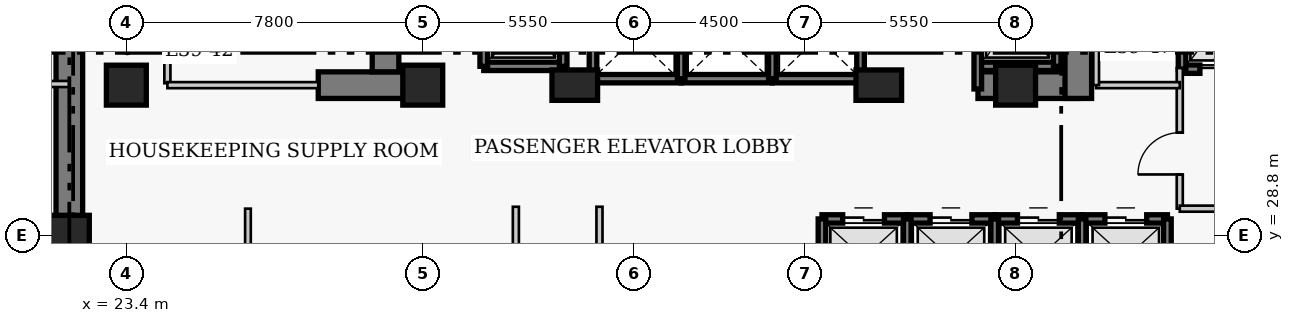
"""IFC4 building model, lengths in metres.
Left out: names, types, materials, properties, quantities, classifications, styles, units other than length and angle.
Written with IfcOpenShell. Run it as: python <this file> out.ifc"""

import sys

from ifc_helpers import new_model, si_unit, direction, frame, frame_2d, origin, origin_2d, place, context, subcontext, project, spatial, rectangle, extrude, element, fill, save


model = new_model("IFC4")
c1 = context("Model", 3, precision=1e-05, world=origin(), true_north=direction((0.0, 1.0)))
c2 = subcontext(c1, "Body", "Model", "MODEL_VIEW")
j1 = project(units=[si_unit("LENGTHUNIT", "METRE"), si_unit("PLANEANGLEUNIT", "RADIAN")], contexts=[c1])
p1 = place(None, origin())
s1 = spatial("IfcSite", under=j1, at=p1, CompositionType="ELEMENT")
p2 = place(p1, origin())
s2 = spatial("IfcBuilding", under=s1, at=p2, CompositionType="ELEMENT")
p3 = place(p2, frame((0.0, 0.0, 157.4)))
s3 = spatial("IfcBuildingStorey", under=s2, at=p3, CompositionType="ELEMENT", Elevation=157.4)
p4 = place(p3, frame((21.9, 27.05, 0.0), z_axis=(0.0, 0.0, 1.0), x_axis=(0.0, 1.0, 0.0)))
e1 = element("IfcWall", 1, at=p4, inside=s3, PredefinedType="SHEAR", context=c2, shape_type="SweptSolid", body=[
    extrude(rectangle(XDim=13.62, YDim=0.7, at=frame_2d((6.81, 0.0))), origin(), (0.0, 0.0, 1.0), 3.8),
])
p5 = place(p3, frame((28.45, 32.75, 0.0), z_axis=(0.0, 0.0, 1.0), x_axis=(1.0, 0.0, 0.0)))
e2 = element("IfcWall", 2, at=p5, inside=s3, PredefinedType="SHEAR", context=c2, shape_type="SweptSolid", body=[
    extrude(rectangle(XDim=2.4, YDim=0.7, at=frame_2d((1.2, 0.0))), origin(), (0.0, 0.0, 1.0), 3.8),
])
p6 = place(p3, frame((45.81, 32.75, 0.0), z_axis=(0.0, 0.0, 1.0), x_axis=(1.0, 0.0, 0.0)))
e3 = element("IfcWall", 3, at=p6, inside=s3, PredefinedType="SHEAR", context=c2, shape_type="SweptSolid", body=[
    extrude(rectangle(XDim=2.64, YDim=0.7, at=frame_2d((1.32, 0.0))), origin(), (0.0, 0.0, 1.0), 3.8),
])
p7 = place(p3, frame((30.22, 33.1, 0.0), z_axis=(0.0, 0.0, 1.0), x_axis=(0.0, 1.0, 0.0)))
e4 = element("IfcWall", 4, at=p7, inside=s3, PredefinedType="SHEAR", context=c2, shape_type="SweptSolid", body=[
    extrude(rectangle(XDim=7.22, YDim=0.7, at=frame_2d((3.61, 0.0))), origin(), (0.0, 0.0, 1.0), 3.8),
])
p8 = place(p3, frame((48.45, 32.4, 0.0), z_axis=(0.0, 0.0, 1.0), x_axis=(0.0, 1.0, 0.0)))
e5 = element("IfcWall", 5, at=p8, inside=s3, PredefinedType="SHEAR", context=c2, shape_type="SweptSolid", body=[
    extrude(rectangle(XDim=7.92, YDim=0.7, at=frame_2d((3.96, 0.0))), origin(), (0.0, 0.0, 1.0), 3.8),
])
p9 = place(p8, frame((5.8, 0.0, 0.0)))
e6 = element("IfcOpeningElement", 6, at=p9, cuts=e5, PredefinedType="OPENING", context=c2, shape_type="SweptSolid", body=[
    extrude(rectangle(XDim=1.1, YDim=2.15, at=frame_2d((0.55, 1.075))), frame((0.0, 0.36, 0.0), z_axis=(0.0, -1.0, 0.0), x_axis=(1.0, 0.0, 0.0)), (0.0, 0.0, 1.0), 0.72),
])
for number, where, z_axis, x_axis in (
    (7, (21.9, 28.8, 0.0), (0.0, 0.0, 1.0), (1.0, 0.0, 0.0)),
    (8, (23.4, 32.75, 0.0), (0.0, 0.0, 1.0), (1.0, 0.0, 0.0)),
    (9, (31.2, 32.75, 0.0), (0.0, 0.0, 1.0), (1.0, 0.0, 0.0)),
):
    element("IfcColumn", number, at=place(p3, frame(where, z_axis=z_axis, x_axis=x_axis)), inside=s3, PredefinedType="COLUMN", context=c2, shape_type="SweptSolid", body=[
        extrude(rectangle(XDim=1.05, YDim=1.05, at=origin_2d()), origin(), (0.0, 0.0, 1.0), 3.8),
    ])
for number, where, z_axis, x_axis in (
    (10, (35.2, 32.75, 0.0), (0.0, 0.0, 1.0), (1.0, 0.0, 0.0)),
    (11, (43.2, 32.75, 0.0), (0.0, 0.0, 1.0), (1.0, 0.0, 0.0)),
):
    element("IfcColumn", number, at=place(p3, frame(where, z_axis=z_axis, x_axis=x_axis)), inside=s3, PredefinedType="COLUMN", context=c2, shape_type="SweptSolid", body=[
        extrude(rectangle(XDim=1.2, YDim=0.8, at=origin_2d()), origin(), (0.0, 0.0, 1.0), 3.8),
    ])
p10 = place(p3, frame((46.8, 32.75, 0.0), z_axis=(0.0, 0.0, 1.0), x_axis=(1.0, 0.0, 0.0)))
e12 = element("IfcColumn", 12, at=p10, inside=s3, PredefinedType="COLUMN", context=c2, shape_type="SweptSolid", body=[
    extrude(rectangle(XDim=1.05, YDim=1.05, at=origin_2d()), origin(), (0.0, 0.0, 1.0), 3.8),
])
p11 = place(p3, frame((41.705, 29.23, 0.0), z_axis=(0.0, 0.0, 1.0), x_axis=(1.0, 0.0, 0.0)))
e13 = element("IfcWall", 13, at=p11, inside=s3, PredefinedType="SHEAR", context=c2, shape_type="SweptSolid", body=[
    extrude(rectangle(XDim=2.245, YDim=0.22, at=frame_2d((1.123, 0.0))), origin(), (0.0, 0.0, 1.0), 3.8),
])
p12 = place(p11, frame((0.545, 0.0, 0.0)))
e14 = element("IfcOpeningElement", 14, at=p12, cuts=e13, PredefinedType="OPENING", context=c2, shape_type="SweptSolid", body=[
    extrude(rectangle(XDim=1.1, YDim=2.15, at=frame_2d((0.55, 1.075))), frame((0.0, 0.12, 0.0), z_axis=(0.0, -1.0, 0.0), x_axis=(1.0, 0.0, 0.0)), (0.0, 0.0, 1.0), 0.24),
])
p13 = place(p3, frame((41.705, 27.17, 0.0), z_axis=(0.0, 0.0, 1.0), x_axis=(0.0, 1.0, 0.0)))
e15 = element("IfcWall", 15, at=p13, inside=s3, PredefinedType="SHEAR", context=c2, shape_type="SweptSolid", body=[
    extrude(rectangle(XDim=2.06, YDim=0.2, at=frame_2d((1.03, 0.0))), origin(), (0.0, 0.0, 1.0), 3.8),
])
p14 = place(p3, frame((43.95, 29.23, 0.0), z_axis=(0.0, 0.0, 1.0), x_axis=(1.0, 0.0, 0.0)))
e16 = element("IfcWall", 16, at=p14, inside=s3, PredefinedType="SHEAR", context=c2, shape_type="SweptSolid", body=[
    extrude(rectangle(XDim=2.3, YDim=0.22, at=frame_2d((1.15, 0.0))), origin(), (0.0, 0.0, 1.0), 3.8),
])
p15 = place(p14, frame((0.6, 0.0, 0.0)))
e17 = element("IfcOpeningElement", 17, at=p15, cuts=e16, PredefinedType="OPENING", context=c2, shape_type="SweptSolid", body=[
    extrude(rectangle(XDim=1.1, YDim=2.15, at=frame_2d((0.55, 1.075))), frame((0.0, 0.12, 0.0), z_axis=(0.0, -1.0, 0.0), x_axis=(1.0, 0.0, 0.0)), (0.0, 0.0, 1.0), 0.24),
])
p16 = place(p3, frame((43.95, 27.17, 0.0), z_axis=(0.0, 0.0, 1.0), x_axis=(0.0, 1.0, 0.0)))
e18 = element("IfcWall", 18, at=p16, inside=s3, PredefinedType="SHEAR", context=c2, shape_type="SweptSolid", body=[
    extrude(rectangle(XDim=2.06, YDim=0.2, at=frame_2d((1.03, 0.0))), origin(), (0.0, 0.0, 1.0), 3.8),
])
p17 = place(p3, frame((46.25, 29.23, 0.0), z_axis=(0.0, 0.0, 1.0), x_axis=(1.0, 0.0, 0.0)))
e19 = element("IfcWall", 19, at=p17, inside=s3, PredefinedType="SHEAR", context=c2, shape_type="SweptSolid", body=[
    extrude(rectangle(XDim=2.3, YDim=0.22, at=frame_2d((1.15, 0.0))), origin(), (0.0, 0.0, 1.0), 3.8),
])
p18 = place(p17, frame((0.6, 0.0, 0.0)))
e20 = element("IfcOpeningElement", 20, at=p18, cuts=e19, PredefinedType="OPENING", context=c2, shape_type="SweptSolid", body=[
    extrude(rectangle(XDim=1.1, YDim=2.15, at=frame_2d((0.55, 1.075))), frame((0.0, 0.12, 0.0), z_axis=(0.0, -1.0, 0.0), x_axis=(1.0, 0.0, 0.0)), (0.0, 0.0, 1.0), 0.24),
])
p19 = place(p3, frame((46.25, 27.17, 0.0), z_axis=(0.0, 0.0, 1.0), x_axis=(0.0, 1.0, 0.0)))
e21 = element("IfcWall", 21, at=p19, inside=s3, PredefinedType="SHEAR", context=c2, shape_type="SweptSolid", body=[
    extrude(rectangle(XDim=2.06, YDim=0.2, at=frame_2d((1.03, 0.0))), origin(), (0.0, 0.0, 1.0), 3.8),
])
p20 = place(p3, frame((48.55, 29.23, 0.0), z_axis=(0.0, 0.0, 1.0), x_axis=(1.0, 0.0, 0.0)))
e22 = element("IfcWall", 22, at=p20, inside=s3, PredefinedType="SHEAR", context=c2, shape_type="SweptSolid", body=[
    extrude(rectangle(XDim=2.245, YDim=0.22, at=frame_2d((1.123, 0.0))), origin(), (0.0, 0.0, 1.0), 3.8),
])
p21 = place(p20, frame((0.6, 0.0, 0.0)))
e23 = element("IfcOpeningElement", 23, at=p21, cuts=e22, PredefinedType="OPENING", context=c2, shape_type="SweptSolid", body=[
    extrude(rectangle(XDim=1.1, YDim=2.15, at=frame_2d((0.55, 1.075))), frame((0.0, 0.12, 0.0), z_axis=(0.0, -1.0, 0.0), x_axis=(1.0, 0.0, 0.0)), (0.0, 0.0, 1.0), 0.24),
])
for number, where, z_axis, x_axis in (
    (24, (48.55, 27.17, 0.0), (0.0, 0.0, 1.0), (0.0, 1.0, 0.0)),
    (25, (50.795, 27.17, 0.0), (0.0, 0.0, 1.0), (0.0, 1.0, 0.0)),
):
    element("IfcWall", number, at=place(p3, frame(where, z_axis=z_axis, x_axis=x_axis)), inside=s3, PredefinedType="SHEAR", context=c2, shape_type="SweptSolid", body=[
        extrude(rectangle(XDim=2.06, YDim=0.2, at=frame_2d((1.03, 0.0))), origin(), (0.0, 0.0, 1.0), 3.8),
    ])
p22 = place(p3, frame((35.68, 32.92, 0.0), z_axis=(0.0, 0.0, 1.0), x_axis=(1.0, 0.0, 0.0)))
e26 = element("IfcWall", 26, at=p22, inside=s3, PredefinedType="SHEAR", context=c2, shape_type="SweptSolid", body=[
    extrude(rectangle(XDim=2.32, YDim=0.22, at=frame_2d((1.16, 0.0))), origin(), (0.0, 0.0, 1.0), 3.8),
])
p23 = place(p3, frame((35.68, 32.92, 0.0), z_axis=(0.0, 0.0, 1.0), x_axis=(0.0, 1.0, 0.0)))
e27 = element("IfcWall", 27, at=p23, inside=s3, PredefinedType="SHEAR", context=c2, shape_type="SweptSolid", body=[
    extrude(rectangle(XDim=2.16, YDim=0.2, at=frame_2d((1.08, 0.0))), origin(), (0.0, 0.0, 1.0), 3.8),
])
p24 = place(p3, frame((38.0, 32.92, 0.0), z_axis=(0.0, 0.0, 1.0), x_axis=(1.0, 0.0, 0.0)))
e28 = element("IfcWall", 28, at=p24, inside=s3, PredefinedType="SHEAR", context=c2, shape_type="SweptSolid", body=[
    extrude(rectangle(XDim=2.4, YDim=0.22, at=frame_2d((1.2, 0.0))), origin(), (0.0, 0.0, 1.0), 3.8),
])
p25 = place(p3, frame((38.0, 32.92, 0.0), z_axis=(0.0, 0.0, 1.0), x_axis=(0.0, 1.0, 0.0)))
e29 = element("IfcWall", 29, at=p25, inside=s3, PredefinedType="SHEAR", context=c2, shape_type="SweptSolid", body=[
    extrude(rectangle(XDim=2.16, YDim=0.2, at=frame_2d((1.08, 0.0))), origin(), (0.0, 0.0, 1.0), 3.8),
])
p26 = place(p3, frame((40.4, 32.92, 0.0), z_axis=(0.0, 0.0, 1.0), x_axis=(1.0, 0.0, 0.0)))
e30 = element("IfcWall", 30, at=p26, inside=s3, PredefinedType="SHEAR", context=c2, shape_type="SweptSolid", body=[
    extrude(rectangle(XDim=2.32, YDim=0.22, at=frame_2d((1.16, 0.0))), origin(), (0.0, 0.0, 1.0), 3.8),
])
for number, where, z_axis, x_axis in (
    (31, (40.4, 32.92, 0.0), (0.0, 0.0, 1.0), (0.0, 1.0, 0.0)),
    (32, (42.72, 32.92, 0.0), (0.0, 0.0, 1.0), (0.0, 1.0, 0.0)),
):
    element("IfcWall", number, at=place(p3, frame(where, z_axis=z_axis, x_axis=x_axis)), inside=s3, PredefinedType="SHEAR", context=c2, shape_type="SweptSolid", body=[
        extrude(rectangle(XDim=2.16, YDim=0.2, at=frame_2d((1.08, 0.0))), origin(), (0.0, 0.0, 1.0), 3.8),
    ])
p27 = place(p3, frame((51.18, 33.17, 0.0), z_axis=(0.0, 0.0, 1.0), x_axis=(1.0, 0.0, 0.0)))
e33 = element("IfcWall", 33, at=p27, inside=s3, PredefinedType="SHEAR", context=c2, shape_type="SweptSolid", body=[
    extrude(rectangle(XDim=2.42, YDim=0.22, at=frame_2d((1.21, 0.0))), origin(), (0.0, 0.0, 1.0), 3.8),
])
p28 = place(p27, frame((0.47, 0.0, 0.0)))
e34 = element("IfcOpeningElement", 34, at=p28, cuts=e33, PredefinedType="OPENING", context=c2, shape_type="SweptSolid", body=[
    extrude(rectangle(XDim=1.3, YDim=2.15, at=frame_2d((0.65, 1.075))), frame((0.0, 0.12, 0.0), z_axis=(0.0, -1.0, 0.0), x_axis=(1.0, 0.0, 0.0)), (0.0, 0.0, 1.0), 0.24),
])
p29 = place(p3, frame((51.18, 33.17, 0.0), z_axis=(0.0, 0.0, 1.0), x_axis=(0.0, 1.0, 0.0)))
e35 = element("IfcWall", 35, at=p29, inside=s3, PredefinedType="SHEAR", context=c2, shape_type="SweptSolid", body=[
    extrude(rectangle(XDim=2.86, YDim=0.2, at=frame_2d((1.43, 0.0))), origin(), (0.0, 0.0, 1.0), 3.8),
])
p30 = place(p3, frame((32.805, 33.245, 0.0), z_axis=(0.0, 0.0, 1.0), x_axis=(1.0, 0.0, 0.0)))
e36 = element("IfcWall", 36, at=p30, inside=s3, PredefinedType="SHEAR", context=c2, shape_type="SweptSolid", body=[
    extrude(rectangle(XDim=2.09, YDim=0.22, at=frame_2d((1.045, 0.0))), origin(), (0.0, 0.0, 1.0), 3.8),
])
for number, where, z_axis, x_axis in (
    (37, (32.805, 33.245, 0.0), (0.0, 0.0, 1.0), (0.0, 1.0, 0.0)),
    (38, (34.895, 33.245, 0.0), (0.0, 0.0, 1.0), (0.0, 1.0, 0.0)),
):
    element("IfcWall", number, at=place(p3, frame(where, z_axis=z_axis, x_axis=x_axis)), inside=s3, PredefinedType="SHEAR", context=c2, shape_type="SweptSolid", body=[
        extrude(rectangle(XDim=2.91, YDim=0.2, at=frame_2d((1.455, 0.0))), origin(), (0.0, 0.0, 1.0), 3.8),
    ])
p31 = place(p3, frame((45.805, 33.245, 0.0), z_axis=(0.0, 0.0, 1.0), x_axis=(1.0, 0.0, 0.0)))
e39 = element("IfcWall", 39, at=p31, inside=s3, PredefinedType="SHEAR", context=c2, shape_type="SweptSolid", body=[
    extrude(rectangle(XDim=2.09, YDim=0.22, at=frame_2d((1.045, 0.0))), origin(), (0.0, 0.0, 1.0), 3.8),
])
p32 = place(p3, frame((45.805, 32.65, 0.0), z_axis=(0.0, 0.0, 1.0), x_axis=(0.0, 1.0, 0.0)))
e40 = element("IfcWall", 40, at=p32, inside=s3, PredefinedType="SHEAR", context=c2, shape_type="SweptSolid", body=[
    extrude(rectangle(XDim=3.505, YDim=0.2, at=frame_2d((1.752, 0.0))), origin(), (0.0, 0.0, 1.0), 3.8),
])
p33 = place(p3, frame((47.895, 33.245, 0.0), z_axis=(0.0, 0.0, 1.0), x_axis=(0.0, 1.0, 0.0)))
e41 = element("IfcWall", 41, at=p33, inside=s3, PredefinedType="SHEAR", context=c2, shape_type="SweptSolid", body=[
    extrude(rectangle(XDim=2.91, YDim=0.2, at=frame_2d((1.455, 0.0))), origin(), (0.0, 0.0, 1.0), 3.8),
])
p34 = place(p3, frame((24.48, 32.8, 0.0), z_axis=(0.0, 0.0, 1.0), x_axis=(0.0, 1.0, 0.0)))
e42 = element("IfcWall", 42, at=p34, inside=s3, PredefinedType="PARTITIONING", context=c2, shape_type="SweptSolid", body=[
    extrude(rectangle(XDim=3.57, YDim=0.16, at=frame_2d((1.785, 0.0))), origin(), (0.0, 0.0, 1.0), 3.55),
])
p35 = place(p34, frame((1.604, 0.0, 0.0)))
e43 = element("IfcOpeningElement", 43, at=p35, cuts=e42, PredefinedType="OPENING", context=c2, shape_type="SweptSolid", body=[
    extrude(rectangle(XDim=0.9, YDim=2.1, at=frame_2d((0.45, 1.05))), frame((0.0, 0.09, 0.0), z_axis=(0.0, -1.0, 0.0), x_axis=(1.0, 0.0, 0.0)), (0.0, 0.0, 1.0), 0.18),
])
p36 = place(p3, frame((51.12, 29.5, 0.0), z_axis=(0.0, 0.0, 1.0), x_axis=(0.0, 1.0, 0.0)))
e44 = element("IfcWall", 44, at=p36, inside=s3, PredefinedType="PARTITIONING", context=c2, shape_type="SweptSolid", body=[
    extrude(rectangle(XDim=3.7, YDim=0.16, at=frame_2d((1.85, 0.0))), origin(), (0.0, 0.0, 1.0), 3.55),
])
p37 = place(p36, frame((0.9, 0.0, 0.0)))
e45 = element("IfcOpeningElement", 45, at=p37, cuts=e44, PredefinedType="OPENING", context=c2, shape_type="SweptSolid", body=[
    extrude(rectangle(XDim=1.1, YDim=2.15, at=frame_2d((0.55, 1.075))), frame((0.0, 0.09, 0.0), z_axis=(0.0, -1.0, 0.0), x_axis=(1.0, 0.0, 0.0)), (0.0, 0.0, 1.0), 0.18),
])
p38 = place(p3, frame((51.12, 29.5, 0.0), z_axis=(0.0, 0.0, 1.0), x_axis=(1.0, 0.0, 0.0)))
e46 = element("IfcWall", 46, at=p38, inside=s3, PredefinedType="PARTITIONING", context=c2, shape_type="SweptSolid", body=[
    extrude(rectangle(XDim=5.63, YDim=0.16, at=frame_2d((2.815, 0.0))), origin(), (0.0, 0.0, 1.0), 3.55),
])
p39 = place(p3, frame((24.48, 32.75, 0.0), z_axis=(0.0, 0.0, 1.0), x_axis=(1.0, 0.0, 0.0)))
e47 = element("IfcWall", 47, at=p39, inside=s3, PredefinedType="PARTITIONING", context=c2, shape_type="SweptSolid", body=[
    extrude(rectangle(XDim=3.97, YDim=0.16, at=frame_2d((1.985, 0.0))), origin(), (0.0, 0.0, 1.0), 3.55),
])
p40 = place(p3, frame((48.92, 32.75, 0.0), z_axis=(0.0, 0.0, 1.0), x_axis=(1.0, 0.0, 0.0)))
e48 = element("IfcWall", 48, at=p40, inside=s3, PredefinedType="PARTITIONING", context=c2, shape_type="SweptSolid", body=[
    extrude(rectangle(XDim=2.2, YDim=0.16, at=frame_2d((1.1, 0.0))), origin(), (0.0, 0.0, 1.0), 3.55),
])
p41 = place(p3, frame((48.92, 32.75, 0.0), z_axis=(0.0, 0.0, 1.0), x_axis=(0.0, 1.0, 0.0)))
e49 = element("IfcWall", 49, at=p41, inside=s3, PredefinedType="PARTITIONING", context=c2, shape_type="SweptSolid", body=[
    extrude(rectangle(XDim=3.62, YDim=0.15, at=frame_2d((1.81, 0.0))), origin(), (0.0, 0.0, 1.0), 3.55),
])
for number, where, z_axis, x_axis in (
    (50, (33.65, 17.96, 0.0), (0.0, 0.0, 1.0), (0.0, 1.0, 0.0)),
    (51, (35.85, 17.96, 0.0), (0.0, 0.0, 1.0), (0.0, 1.0, 0.0)),
):
    element("IfcWall", number, at=place(p3, frame(where, z_axis=z_axis, x_axis=x_axis)), inside=s3, PredefinedType="PARTITIONING", context=c2, shape_type="SweptSolid", body=[
        extrude(rectangle(XDim=11.59, YDim=0.16, at=frame_2d((5.795, 0.0))), origin(), (0.0, 0.0, 1.0), 3.55),
    ])
p42 = place(p3, frame((18.86, 32.78, 0.0), z_axis=(0.0, 0.0, 1.0), x_axis=(1.0, 0.0, 0.0)))
e52 = element("IfcWall", 52, at=p42, inside=s3, PredefinedType="PARTITIONING", context=c2, shape_type="SweptSolid", body=[
    extrude(rectangle(XDim=3.04, YDim=0.16, at=frame_2d((1.52, 0.0))), origin(), (0.0, 0.0, 1.0), 3.55),
])
p43 = place(p3, frame((26.6, 17.96, 0.0), z_axis=(0.0, 0.0, 1.0), x_axis=(0.0, 1.0, 0.0)))
e53 = element("IfcWall", 53, at=p43, inside=s3, PredefinedType="PARTITIONING", context=c2, shape_type="SweptSolid", body=[
    extrude(rectangle(XDim=11.54, YDim=0.15, at=frame_2d((5.77, 0.0))), origin(), (0.0, 0.0, 1.0), 3.55),
])
p44 = place(p12, origin())
e54 = element("IfcDoor", 54, at=p44, inside=s3, OperationType="DOUBLE_DOOR_SLIDING", PredefinedType="DOOR", context=c2, shape_type="SweptSolid", body=[
    extrude(rectangle(XDim=1.1, YDim=2.15, at=frame_2d((0.55, 1.075))), frame((0.0, 0.025, 0.0), z_axis=(0.0, -1.0, 0.0), x_axis=(1.0, 0.0, 0.0)), (0.0, 0.0, 1.0), 0.05),
])
fill(e14, e54)
p45 = place(p15, origin())
e55 = element("IfcDoor", 55, at=p45, inside=s3, OperationType="DOUBLE_DOOR_SLIDING", PredefinedType="DOOR", context=c2, shape_type="SweptSolid", body=[
    extrude(rectangle(XDim=1.1, YDim=2.15, at=frame_2d((0.55, 1.075))), frame((0.0, 0.025, 0.0), z_axis=(0.0, -1.0, 0.0), x_axis=(1.0, 0.0, 0.0)), (0.0, 0.0, 1.0), 0.05),
])
fill(e17, e55)
p46 = place(p18, origin())
e56 = element("IfcDoor", 56, at=p46, inside=s3, OperationType="DOUBLE_DOOR_SLIDING", PredefinedType="DOOR", context=c2, shape_type="SweptSolid", body=[
    extrude(rectangle(XDim=1.1, YDim=2.15, at=frame_2d((0.55, 1.075))), frame((0.0, 0.025, 0.0), z_axis=(0.0, -1.0, 0.0), x_axis=(1.0, 0.0, 0.0)), (0.0, 0.0, 1.0), 0.05),
])
fill(e20, e56)
p47 = place(p21, origin())
e57 = element("IfcDoor", 57, at=p47, inside=s3, OperationType="DOUBLE_DOOR_SLIDING", PredefinedType="DOOR", context=c2, shape_type="SweptSolid", body=[
    extrude(rectangle(XDim=1.1, YDim=2.15, at=frame_2d((0.55, 1.075))), frame((0.0, 0.025, 0.0), z_axis=(0.0, -1.0, 0.0), x_axis=(1.0, 0.0, 0.0)), (0.0, 0.0, 1.0), 0.05),
])
fill(e23, e57)
p48 = place(p28, origin())
e58 = element("IfcDoor", 58, at=p48, inside=s3, OperationType="DOUBLE_DOOR_SLIDING", PredefinedType="DOOR", context=c2, shape_type="SweptSolid", body=[
    extrude(rectangle(XDim=1.3, YDim=2.15, at=frame_2d((0.65, 1.075))), frame((0.0, 0.025, 0.0), z_axis=(0.0, -1.0, 0.0), x_axis=(1.0, 0.0, 0.0)), (0.0, 0.0, 1.0), 0.05),
])
fill(e34, e58)
p49 = place(p37, origin())
e59 = element("IfcDoor", 59, at=p49, inside=s3, OperationType="SINGLE_SWING_LEFT", PredefinedType="DOOR", context=c2, shape_type="SweptSolid", body=[
    extrude(rectangle(XDim=1.1, YDim=2.15, at=frame_2d((0.55, 1.075))), frame((0.0, 0.025, 0.0), z_axis=(0.0, -1.0, 0.0), x_axis=(1.0, 0.0, 0.0)), (0.0, 0.0, 1.0), 0.05),
])
fill(e45, e59)
save(model, sys.argv[1])
